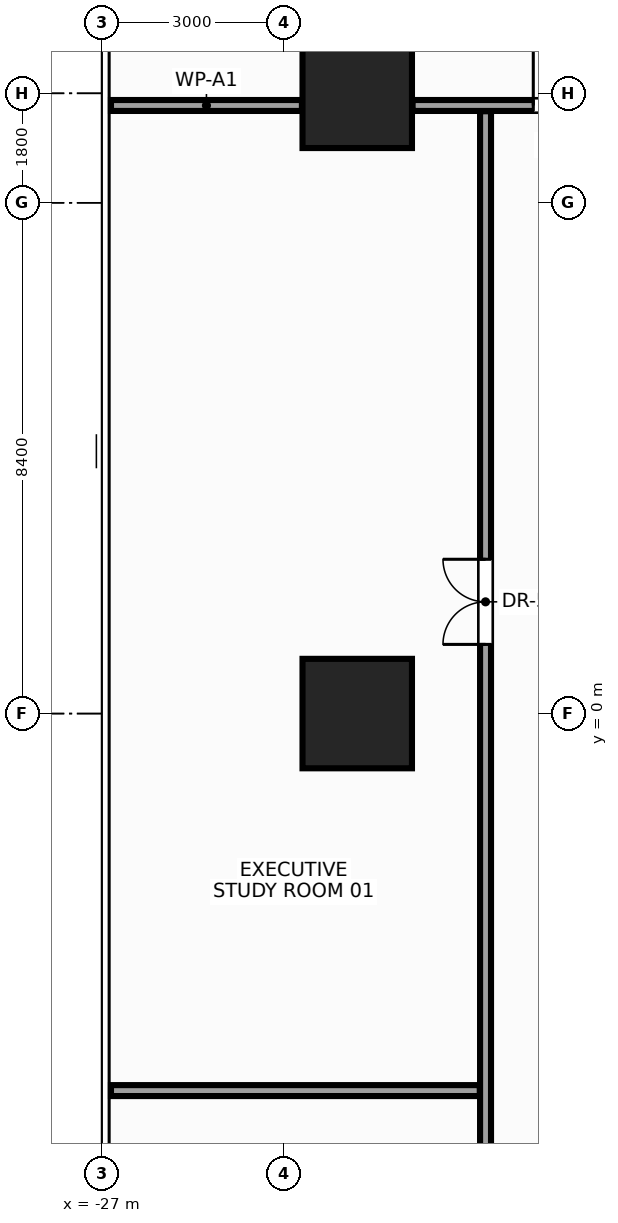
"""IFC4 building model, lengths in metres.
Left out: names, types, materials, properties, quantities, classifications, styles, units other than length and angle.
Written with IfcOpenShell. Run it as: python <this file> out.ifc"""

import sys

from ifc_helpers import new_model, si_unit, direction, frame, frame_2d, origin, origin_2d, place, context, subcontext, project, spatial, rectangle, extrude, source, transform, mapped, element, fill, save


model = new_model("IFC4")
c1 = context("Model", 3, precision=1e-05, world=origin(), true_north=direction((0.0, 1.0)))
c2 = subcontext(c1, "Body", "Model", "MODEL_VIEW")
j1 = project(units=[si_unit("LENGTHUNIT", "METRE"), si_unit("PLANEANGLEUNIT", "RADIAN")], contexts=[c1])
p1 = place(None, origin())
s1 = spatial("IfcSite", under=j1, at=p1, CompositionType="ELEMENT")
p2 = place(p1, origin())
s2 = spatial("IfcBuilding", under=s1, at=p2, CompositionType="ELEMENT")
p3 = place(p2, frame((0.0, 0.0, 63.2)))
s3 = spatial("IfcBuildingStorey", under=s2, at=p3, CompositionType="ELEMENT", Elevation=63.2)
m1 = source(origin(), c2, "Body", "SweptSolid", [
    extrude(rectangle(XDim=1.8, YDim=1.8, at=origin_2d()), origin(), (0.0, 0.0, 1.0), 3.6),
])
for number, where, z_axis, x_axis in (
    (1, (-22.8, 0.0, 0.0), (0.0, 0.0, 1.0), (1.0, 0.0, 0.0)),
    (2, (-22.8, 10.2, 0.0), (0.0, 0.0, 1.0), (1.0, 0.0, 0.0)),
):
    element("IfcColumn", number, at=place(p3, frame(where, z_axis=z_axis, x_axis=x_axis)), inside=s3, PredefinedType="COLUMN", context=c2, shape_type="MappedRepresentation", body=[
        mapped(m1, transform((0.0, 0.0, 0.0), x_axis=(1.0, 0.0, 0.0), y_axis=(0.0, 1.0, 0.0), z_axis=(0.0, 0.0, 1.0), scale=1.0)),
    ])
m2 = source(origin(), c2, "Body", "SweptSolid", [
    extrude(rectangle(XDim=3.14, YDim=0.18, at=frame_2d((1.57, 0.0))), origin(), (0.0, 0.0, 1.0), 2.435),
])
p4 = place(p3, frame((-26.85, 10.0, 0.0), z_axis=(0.0, 0.0, 1.0), x_axis=(1.0, 0.0, 0.0)))
e3 = element("IfcWall", 3, at=p4, inside=s3, PredefinedType="PARTITIONING", context=c2, shape_type="MappedRepresentation", body=[
    mapped(m2, transform((0.0, 0.0, 0.0), x_axis=(1.0, 0.0, 0.0), y_axis=(0.0, 1.0, 0.0), z_axis=(0.0, 0.0, 1.0), scale=1.0)),
])
m3 = source(origin(), c2, "Body", "SweptSolid", [
    extrude(rectangle(XDim=4.18, YDim=0.18, at=frame_2d((2.09, 0.0))), origin(), (0.0, 0.0, 1.0), 2.745),
])
p5 = place(p3, frame((-21.89, 10.0, 0.0), z_axis=(0.0, 0.0, 1.0), x_axis=(1.0, 0.0, 0.0)))
e4 = element("IfcWall", 4, at=p5, inside=s3, PredefinedType="PARTITIONING", context=c2, shape_type="MappedRepresentation", body=[
    mapped(m3, transform((0.0, 0.0, 0.0), x_axis=(1.0, 0.0, 0.0), y_axis=(0.0, 1.0, 0.0), z_axis=(0.0, 0.0, 1.0), scale=1.0)),
])
p6 = place(p5, frame((1.985, 0.0, 0.0)))
e5 = element("IfcOpeningElement", 5, at=p6, cuts=e4, PredefinedType="OPENING", context=c2, shape_type="SweptSolid", body=[
    extrude(rectangle(XDim=0.9, YDim=2.15, at=frame_2d((0.45, 1.075))), frame((0.0, 0.102, 0.0), z_axis=(0.0, -1.0, 0.0), x_axis=(1.0, 0.0, 0.0)), (0.0, 0.0, 1.0), 0.204),
])
m4 = source(origin(), c2, "Body", "SweptSolid", [
    extrude(rectangle(XDim=24.1, YDim=0.18, at=frame_2d((12.05, 0.0))), origin(), (0.0, 0.0, 1.0), 2.745),
])
p7 = place(p3, frame((-20.69, -14.195, 0.0), z_axis=(0.0, 0.0, 1.0), x_axis=(0.0, 1.0, 0.0)))
e6 = element("IfcWall", 6, at=p7, inside=s3, PredefinedType="PARTITIONING", context=c2, shape_type="MappedRepresentation", body=[
    mapped(m4, transform((0.0, 0.0, 0.0), x_axis=(1.0, 0.0, 0.0), y_axis=(0.0, 1.0, 0.0), z_axis=(0.0, 0.0, 1.0), scale=1.0)),
])
p8 = place(p7, frame((15.333, 0.0, 0.0)))
e7 = element("IfcOpeningElement", 7, at=p8, cuts=e6, PredefinedType="OPENING", context=c2, shape_type="SweptSolid", body=[
    extrude(rectangle(XDim=1.4, YDim=2.2, at=frame_2d((0.7, 1.1))), frame((0.0, 0.102, 0.0), z_axis=(0.0, -1.0, 0.0), x_axis=(1.0, 0.0, 0.0)), (0.0, 0.0, 1.0), 0.204),
])
m5 = source(origin(), c2, "Body", "SweptSolid", [
    extrude(rectangle(XDim=6.065, YDim=0.18, at=frame_2d((3.033, 0.0))), origin(), (0.0, 0.0, 1.0), 2.745),
])
p9 = place(p3, frame((-26.85, -6.2, 0.0), z_axis=(0.0, 0.0, 1.0), x_axis=(1.0, 0.0, 0.0)))
e8 = element("IfcWall", 8, at=p9, inside=s3, PredefinedType="PARTITIONING", context=c2, shape_type="MappedRepresentation", body=[
    mapped(m5, transform((0.0, 0.0, 0.0), x_axis=(1.0, 0.0, 0.0), y_axis=(0.0, 1.0, 0.0), z_axis=(0.0, 0.0, 1.0), scale=1.0)),
])
m6 = source(origin(), c2, "Body", "SweptSolid", [
    extrude(rectangle(XDim=0.9, YDim=2.15, at=frame_2d((0.45, 1.075))), frame((0.0, 0.025, 0.0), z_axis=(0.0, -1.0, 0.0), x_axis=(1.0, 0.0, 0.0)), (0.0, 0.0, 1.0), 0.05),
])
p10 = place(p6, origin())
e9 = element("IfcDoor", 9, at=p10, inside=s3, OperationType="SINGLE_SWING_LEFT", PredefinedType="DOOR", context=c2, shape_type="MappedRepresentation", body=[
    mapped(m6, transform((0.0, 0.0, 0.0), x_axis=(1.0, 0.0, 0.0), y_axis=(0.0, 1.0, 0.0), z_axis=(0.0, 0.0, 1.0), scale=1.0)),
])
fill(e5, e9)
m7 = source(origin(), c2, "Body", "SweptSolid", [
    extrude(rectangle(XDim=1.4, YDim=2.2, at=frame_2d((0.7, 1.1))), frame((0.0, 0.025, 0.0), z_axis=(0.0, -1.0, 0.0), x_axis=(1.0, 0.0, 0.0)), (0.0, 0.0, 1.0), 0.05),
])
p11 = place(p8, origin())
e10 = element("IfcDoor", 10, at=p11, inside=s3, OperationType="DOUBLE_DOOR_SINGLE_SWING", PredefinedType="DOOR", context=c2, shape_type="MappedRepresentation", body=[
    mapped(m7, transform((0.0, 0.0, 0.0), x_axis=(1.0, 0.0, 0.0), y_axis=(0.0, 1.0, 0.0), z_axis=(0.0, 0.0, 1.0), scale=1.0)),
])
fill(e7, e10)
save(model, sys.argv[1])
